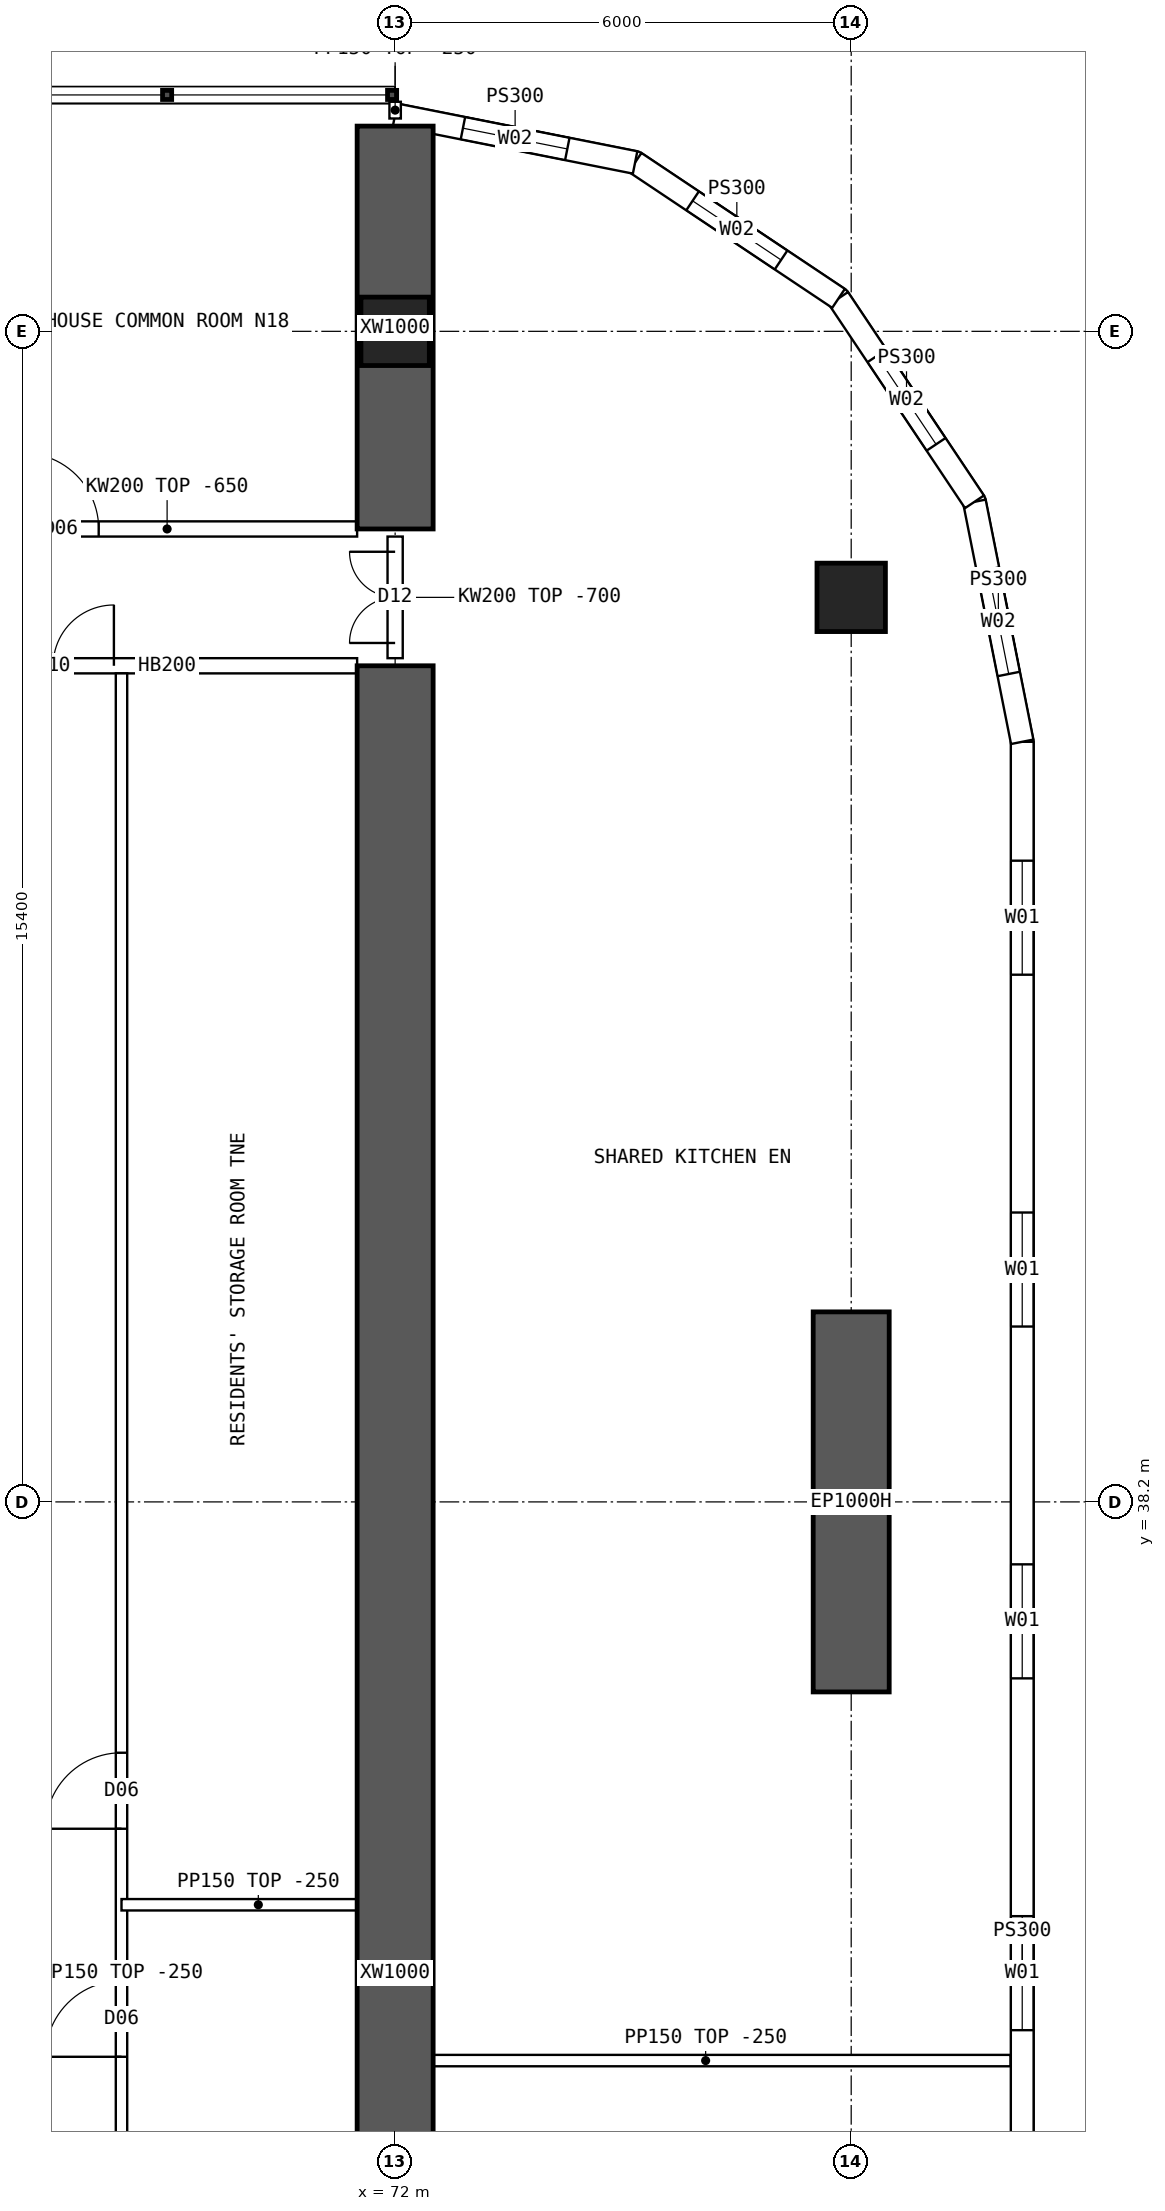
"""IFC4 building model, lengths in metres.
Left out: names, types, materials, properties, quantities, classifications, styles, units other than length and angle.
Written with IfcOpenShell. Run it as: python <this file> out.ifc"""

import sys

from ifc_helpers import new_model, si_unit, direction, frame, frame_2d, origin, origin_2d, place, context, subcontext, project, spatial, polyline, rectangle, hollow_rectangle, outline, extrude, element, fill, save


model = new_model("IFC4")
c1 = context("Model", 3, precision=1e-05, world=origin(), true_north=direction((0.0, 1.0)))
c2 = subcontext(c1, "Body", "Model", "MODEL_VIEW")
j1 = project(units=[si_unit("LENGTHUNIT", "METRE"), si_unit("PLANEANGLEUNIT", "RADIAN")], contexts=[c1])
p1 = place(None, origin())
s1 = spatial("IfcSite", under=j1, at=p1, CompositionType="ELEMENT")
p2 = place(p1, origin())
s2 = spatial("IfcBuilding", under=s1, at=p2, CompositionType="ELEMENT")
p3 = place(p2, frame((0.0, 0.0, 53.95)))
s3 = spatial("IfcBuildingStorey", under=s2, at=p3, CompositionType="ELEMENT", Elevation=53.95)
for number, where, z_axis, x_axis in (
    (1, (72.0, 53.6, 0.0), (0.0, 0.0, 1.0), (1.0, 0.0, 0.0)),
    (2, (78.0, 50.1, 0.0), (0.0, 0.0, 1.0), (1.0, 0.0, 0.0)),
):
    element("IfcColumn", number, at=place(p3, frame(where, z_axis=z_axis, x_axis=x_axis)), inside=s3, PredefinedType="COLUMN", context=c2, shape_type="SweptSolid", body=[
        extrude(hollow_rectangle(XDim=0.9, YDim=0.9, WallThickness=0.09, at=origin_2d()), origin(), (0.0, 0.0, 1.0), 3.75),
    ])
p4 = place(p3, frame((78.0, 35.7, 0.0), z_axis=(0.0, 0.0, 1.0), x_axis=(0.0, 1.0, 0.0)))
e3 = element("IfcWall", 3, at=p4, inside=s3, PredefinedType="SHEAR", context=c2, shape_type="SweptSolid", body=[
    extrude(rectangle(XDim=5.0, YDim=1.0, at=frame_2d((2.5, 0.0))), origin(), (0.0, 0.0, 1.0), 3.75),
])
p5 = place(p3, frame((72.0, 51.0, 0.0), z_axis=(0.0, 0.0, 1.0), x_axis=(0.0, 1.0, 0.0)))
e4 = element("IfcWall", 4, at=p5, inside=s3, PredefinedType="SHEAR", context=c2, shape_type="SweptSolid", body=[
    extrude(rectangle(XDim=5.3, YDim=1.0, at=frame_2d((2.65, 0.0))), origin(), (0.0, 0.0, 1.0), 3.75),
])
p6 = place(p3, frame((72.0, 14.8, 0.0), z_axis=(0.0, 0.0, 1.0), x_axis=(0.0, 1.0, 0.0)))
e5 = element("IfcWall", 5, at=p6, inside=s3, PredefinedType="SHEAR", context=c2, shape_type="SweptSolid", body=[
    extrude(rectangle(XDim=34.4, YDim=1.0, at=frame_2d((17.2, 0.0))), origin(), (0.0, 0.0, 1.0), 3.75),
])
p7 = place(p3, frame((80.25, 15.8, 0.0), z_axis=(0.0, 0.0, 1.0), x_axis=(0.0, 1.0, 0.0)))
e6 = element("IfcWall", 6, at=p7, inside=s3, PredefinedType="SOLIDWALL", context=c2, shape_type="SweptSolid", body=[
    extrude(outline(polyline([(-0.015, -0.15), (32.415, -0.15), (32.385, 0.15), (0.015, 0.15), (-0.015, -0.15)])), origin(), (0.0, 0.0, 1.0), 3.5),
])
p8 = place(p7, frame((1.564, 0.0, 0.9)))
e7 = element("IfcOpeningElement", 7, at=p8, cuts=e6, PredefinedType="OPENING", context=c2, shape_type="SweptSolid", body=[
    extrude(rectangle(XDim=1.5, YDim=2.0, at=frame_2d((0.75, 1.0))), frame((0.0, 0.16, 0.0), z_axis=(0.0, -1.0, 0.0), x_axis=(1.0, 0.0, 0.0)), (0.0, 0.0, 1.0), 0.32),
])
p9 = place(p7, frame((6.193, 0.0, 0.9)))
e8 = element("IfcOpeningElement", 8, at=p9, cuts=e6, PredefinedType="OPENING", context=c2, shape_type="SweptSolid", body=[
    extrude(rectangle(XDim=1.5, YDim=2.0, at=frame_2d((0.75, 1.0))), frame((0.0, 0.16, 0.0), z_axis=(0.0, -1.0, 0.0), x_axis=(1.0, 0.0, 0.0)), (0.0, 0.0, 1.0), 0.32),
])
p10 = place(p7, frame((10.822, 0.0, 0.9)))
e9 = element("IfcOpeningElement", 9, at=p10, cuts=e6, PredefinedType="OPENING", context=c2, shape_type="SweptSolid", body=[
    extrude(rectangle(XDim=1.5, YDim=2.0, at=frame_2d((0.75, 1.0))), frame((0.0, 0.16, 0.0), z_axis=(0.0, -1.0, 0.0), x_axis=(1.0, 0.0, 0.0)), (0.0, 0.0, 1.0), 0.32),
])
p11 = place(p7, frame((15.45, 0.0, 0.9)))
e10 = element("IfcOpeningElement", 10, at=p11, cuts=e6, PredefinedType="OPENING", context=c2, shape_type="SweptSolid", body=[
    extrude(rectangle(XDim=1.5, YDim=2.0, at=frame_2d((0.75, 1.0))), frame((0.0, 0.16, 0.0), z_axis=(0.0, -1.0, 0.0), x_axis=(1.0, 0.0, 0.0)), (0.0, 0.0, 1.0), 0.32),
])
p12 = place(p7, frame((20.079, 0.0, 0.9)))
e11 = element("IfcOpeningElement", 11, at=p12, cuts=e6, PredefinedType="OPENING", context=c2, shape_type="SweptSolid", body=[
    extrude(rectangle(XDim=1.5, YDim=2.0, at=frame_2d((0.75, 1.0))), frame((0.0, 0.16, 0.0), z_axis=(0.0, -1.0, 0.0), x_axis=(1.0, 0.0, 0.0)), (0.0, 0.0, 1.0), 0.32),
])
p13 = place(p7, frame((24.707, 0.0, 0.9)))
e12 = element("IfcOpeningElement", 12, at=p13, cuts=e6, PredefinedType="OPENING", context=c2, shape_type="SweptSolid", body=[
    extrude(rectangle(XDim=1.5, YDim=2.0, at=frame_2d((0.75, 1.0))), frame((0.0, 0.16, 0.0), z_axis=(0.0, -1.0, 0.0), x_axis=(1.0, 0.0, 0.0)), (0.0, 0.0, 1.0), 0.32),
])
p14 = place(p7, frame((29.336, 0.0, 0.9)))
e13 = element("IfcOpeningElement", 13, at=p14, cuts=e6, PredefinedType="OPENING", context=c2, shape_type="SweptSolid", body=[
    extrude(rectangle(XDim=1.5, YDim=2.0, at=frame_2d((0.75, 1.0))), frame((0.0, 0.16, 0.0), z_axis=(0.0, -1.0, 0.0), x_axis=(1.0, 0.0, 0.0)), (0.0, 0.0, 1.0), 0.32),
])
p15 = place(p3, frame((80.25, 48.2, 0.0), z_axis=(0.0, 0.0, 1.0), x_axis=(-0.195065901187, 0.980790137692, 0.0)))
e14 = element("IfcWall", 14, at=p15, inside=s3, PredefinedType="SOLIDWALL", context=c2, shape_type="SweptSolid", body=[
    extrude(outline(polyline([(-0.015, -0.15), (3.249, -0.15), (3.189, 0.15), (0.015, 0.15), (-0.015, -0.15)])), origin(), (0.0, 0.0, 1.0), 3.5),
])
p16 = place(p15, frame((0.909, 0.0, 0.9)))
e15 = element("IfcOpeningElement", 15, at=p16, cuts=e14, PredefinedType="OPENING", context=c2, shape_type="SweptSolid", body=[
    extrude(rectangle(XDim=1.4, YDim=1.8, at=frame_2d((0.7, 0.9))), frame((0.0, 0.16, 0.0), z_axis=(0.0, -1.0, 0.0), x_axis=(1.0, 0.0, 0.0)), (0.0, 0.0, 1.0), 0.32),
])
p17 = place(p3, frame((79.622, 51.357, 0.0), z_axis=(0.0, 0.0, 1.0), x_axis=(-0.555609954424, 0.831443069936, 0.0)))
e16 = element("IfcWall", 16, at=p17, inside=s3, PredefinedType="SOLIDWALL", context=c2, shape_type="SweptSolid", body=[
    extrude(outline(polyline([(-0.03, -0.15), (3.249, -0.15), (3.189, 0.15), (0.03, 0.15), (-0.03, -0.15)])), origin(), (0.0, 0.0, 1.0), 3.5),
])
p18 = place(p17, frame((0.909, 0.0, 0.9)))
e17 = element("IfcOpeningElement", 17, at=p18, cuts=e16, PredefinedType="OPENING", context=c2, shape_type="SweptSolid", body=[
    extrude(rectangle(XDim=1.4, YDim=1.8, at=frame_2d((0.7, 0.9))), frame((0.0, 0.16, 0.0), z_axis=(0.0, -1.0, 0.0), x_axis=(1.0, 0.0, 0.0)), (0.0, 0.0, 1.0), 0.32),
])
p19 = place(p3, frame((77.833, 54.034, 0.0), z_axis=(0.0, 0.0, 1.0), x_axis=(-0.831478105043, 0.555557522525, 0.0)))
e18 = element("IfcWall", 18, at=p19, inside=s3, PredefinedType="SOLIDWALL", context=c2, shape_type="SweptSolid", body=[
    extrude(outline(polyline([(-0.03, -0.15), (3.249, -0.15), (3.189, 0.15), (0.03, 0.15), (-0.03, -0.15)])), origin(), (0.0, 0.0, 1.0), 3.5),
])
p20 = place(p19, frame((0.909, 0.0, 0.9)))
e19 = element("IfcOpeningElement", 19, at=p20, cuts=e18, PredefinedType="OPENING", context=c2, shape_type="SweptSolid", body=[
    extrude(rectangle(XDim=1.4, YDim=1.8, at=frame_2d((0.7, 0.9))), frame((0.0, 0.16, 0.0), z_axis=(0.0, -1.0, 0.0), x_axis=(1.0, 0.0, 0.0)), (0.0, 0.0, 1.0), 0.32),
])
p21 = place(p3, frame((75.157, 55.822, 0.0), z_axis=(0.0, 0.0, 1.0), x_axis=(-0.980787251524, 0.195080412259, 0.0)))
e20 = element("IfcWall", 20, at=p21, inside=s3, PredefinedType="SOLIDWALL", context=c2, shape_type="SweptSolid", body=[
    extrude(outline(polyline([(-0.03, -0.15), (3.249, -0.15), (3.189, 0.15), (0.03, 0.15), (-0.03, -0.15)])), origin(), (0.0, 0.0, 1.0), 3.5),
])
p22 = place(p21, frame((0.909, 0.0, 0.9)))
e21 = element("IfcOpeningElement", 21, at=p22, cuts=e20, PredefinedType="OPENING", context=c2, shape_type="SweptSolid", body=[
    extrude(rectangle(XDim=1.4, YDim=1.8, at=frame_2d((0.7, 0.9))), frame((0.0, 0.16, 0.0), z_axis=(0.0, -1.0, 0.0), x_axis=(1.0, 0.0, 0.0)), (0.0, 0.0, 1.0), 0.32),
])
p23 = place(p3, frame((66.5, 51.0, 0.0), z_axis=(0.0, 0.0, 1.0), x_axis=(1.0, 0.0, 0.0)))
e22 = element("IfcWall", 22, at=p23, inside=s3, PredefinedType="SOLIDWALL", context=c2, shape_type="SweptSolid", body=[
    extrude(outline(polyline([(0.0, 0.0), (5.0, 0.0), (5.0, 3.1), (0.0, 3.1), (0.0, 0.0)])), frame((0.0, 0.1, 0.0), z_axis=(0.0, -1.0, 0.0), x_axis=(1.0, 0.0, 0.0)), (0.0, 0.0, 1.0), 0.2),
])
p24 = place(p23, frame((0.6, 0.0, 0.0)))
e23 = element("IfcOpeningElement", 23, at=p24, cuts=e22, PredefinedType="OPENING", context=c2, shape_type="SweptSolid", body=[
    extrude(rectangle(XDim=1.0, YDim=2.1, at=frame_2d((0.5, 1.05))), frame((0.0, 0.11, 0.0), z_axis=(0.0, -1.0, 0.0), x_axis=(1.0, 0.0, 0.0)), (0.0, 0.0, 1.0), 0.22),
])
p25 = place(p3, frame((66.5, 49.2, 0.0), z_axis=(0.0, 0.0, 1.0), x_axis=(1.0, 0.0, 0.0)))
e24 = element("IfcWall", 24, at=p25, inside=s3, PredefinedType="SOLIDWALL", context=c2, shape_type="SweptSolid", body=[
    extrude(rectangle(XDim=5.0, YDim=0.2, at=frame_2d((2.5, 0.0))), origin(), (0.0, 0.0, 1.0), 3.5),
])
p26 = place(p25, frame((0.2, 0.0, 0.0)))
e25 = element("IfcOpeningElement", 25, at=p26, cuts=e24, PredefinedType="OPENING", context=c2, shape_type="SweptSolid", body=[
    extrude(rectangle(XDim=1.6, YDim=2.1, at=frame_2d((0.8, 1.05))), frame((0.0, 0.11, 0.0), z_axis=(0.0, -1.0, 0.0), x_axis=(1.0, 0.0, 0.0)), (0.0, 0.0, 1.0), 0.22),
])
p27 = place(p3, frame((68.4, 14.9, 0.0), z_axis=(0.0, 0.0, 1.0), x_axis=(0.0, 1.0, 0.0)))
e26 = element("IfcWall", 26, at=p27, inside=s3, PredefinedType="PARTITIONING", context=c2, shape_type="SweptSolid", body=[
    extrude(rectangle(XDim=34.2, YDim=0.15, at=frame_2d((17.1, 0.0))), origin(), (0.0, 0.0, 1.0), 3.5),
])
p28 = place(p27, frame((16.0, 0.0, 0.0)))
e27 = element("IfcOpeningElement", 27, at=p28, cuts=e26, PredefinedType="OPENING", context=c2, shape_type="SweptSolid", body=[
    extrude(rectangle(XDim=1.0, YDim=2.1, at=frame_2d((0.5, 1.05))), frame((0.0, 0.085, 0.0), z_axis=(0.0, -1.0, 0.0), x_axis=(1.0, 0.0, 0.0)), (0.0, 0.0, 1.0), 0.17),
])
p29 = place(p27, frame((19.0, 0.0, 0.0)))
e28 = element("IfcOpeningElement", 28, at=p29, cuts=e26, PredefinedType="OPENING", context=c2, shape_type="SweptSolid", body=[
    extrude(rectangle(XDim=1.0, YDim=2.1, at=frame_2d((0.5, 1.05))), frame((0.0, 0.085, 0.0), z_axis=(0.0, -1.0, 0.0), x_axis=(1.0, 0.0, 0.0)), (0.0, 0.0, 1.0), 0.17),
])
p30 = place(p3, frame((68.4, 32.9, 0.0), z_axis=(0.0, 0.0, 1.0), x_axis=(1.0, 0.0, 0.0)))
e29 = element("IfcWall", 29, at=p30, inside=s3, PredefinedType="PARTITIONING", context=c2, shape_type="SweptSolid", body=[
    extrude(rectangle(XDim=3.6, YDim=0.15, at=frame_2d((1.8, 0.0))), origin(), (0.0, 0.0, 1.0), 3.5),
])
p31 = place(p3, frame((72.075, 30.85, 0.0), z_axis=(0.0, 0.0, 1.0), x_axis=(1.0, 0.0, 0.0)))
e30 = element("IfcWall", 30, at=p31, inside=s3, PredefinedType="PARTITIONING", context=c2, shape_type="SweptSolid", body=[
    extrude(outline(polyline([(0.0, 0.0), (8.02, 0.0), (8.02, 3.5), (6.227, 3.5), (6.225, 3.05), (5.627, 3.05), (5.625, 3.5), (0.0, 3.5), (0.0, 0.0)])), frame((0.0, 0.075, 0.0), z_axis=(0.0, -1.0, 0.0), x_axis=(1.0, 0.0, 0.0)), (0.0, 0.0, 1.0), 0.15),
])
p32 = place(p3, frame((72.0, 49.3, 0.0), z_axis=(0.0, 0.0, 1.0), x_axis=(0.0, 1.0, 0.0)))
e31 = element("IfcWall", 31, at=p32, inside=s3, PredefinedType="SOLIDWALL", context=c2, shape_type="SweptSolid", body=[
    extrude(outline(polyline([(0.0, 0.0), (1.6, 0.0), (1.6, 3.05), (0.0, 3.05), (0.0, 0.0)])), frame((0.0, 0.1, 0.0), z_axis=(0.0, -1.0, 0.0), x_axis=(1.0, 0.0, 0.0)), (0.0, 0.0, 1.0), 0.2),
])
p33 = place(p32, frame((0.2, 0.0, 0.0)))
e32 = element("IfcOpeningElement", 32, at=p33, cuts=e31, PredefinedType="OPENING", context=c2, shape_type="SweptSolid", body=[
    extrude(rectangle(XDim=1.2, YDim=2.1, at=frame_2d((0.6, 1.05))), frame((0.0, 0.11, 0.0), z_axis=(0.0, -1.0, 0.0), x_axis=(1.0, 0.0, 0.0)), (0.0, 0.0, 1.0), 0.22),
])
p34 = place(p3, frame((72.0, 56.4, 0.0), z_axis=(0.0, 0.0, 1.0), x_axis=(0.0, 1.0, 0.0)))
e33 = element("IfcWall", 33, at=p34, inside=s3, PredefinedType="PARTITIONING", context=c2, shape_type="SweptSolid", body=[
    extrude(rectangle(XDim=0.22, YDim=0.15, at=frame_2d((0.11, 0.0))), origin(), (0.0, 0.0, 1.0), 3.5),
])
p35 = place(p11, origin())
e34 = element("IfcWindow", 34, at=p35, inside=s3, PartitioningType="SINGLE_PANEL", PredefinedType="WINDOW", context=c2, shape_type="SweptSolid", body=[
    extrude(rectangle(XDim=1.5, YDim=2.0, at=frame_2d((0.75, 1.0))), frame((0.0, 0.03, 0.0), z_axis=(0.0, -1.0, 0.0), x_axis=(1.0, 0.0, 0.0)), (0.0, 0.0, 1.0), 0.06),
])
fill(e10, e34)
p36 = place(p12, origin())
e35 = element("IfcWindow", 35, at=p36, inside=s3, PartitioningType="SINGLE_PANEL", PredefinedType="WINDOW", context=c2, shape_type="SweptSolid", body=[
    extrude(rectangle(XDim=1.5, YDim=2.0, at=frame_2d((0.75, 1.0))), frame((0.0, 0.03, 0.0), z_axis=(0.0, -1.0, 0.0), x_axis=(1.0, 0.0, 0.0)), (0.0, 0.0, 1.0), 0.06),
])
fill(e11, e35)
p37 = place(p13, origin())
e36 = element("IfcWindow", 36, at=p37, inside=s3, PartitioningType="SINGLE_PANEL", PredefinedType="WINDOW", context=c2, shape_type="SweptSolid", body=[
    extrude(rectangle(XDim=1.5, YDim=2.0, at=frame_2d((0.75, 1.0))), frame((0.0, 0.03, 0.0), z_axis=(0.0, -1.0, 0.0), x_axis=(1.0, 0.0, 0.0)), (0.0, 0.0, 1.0), 0.06),
])
fill(e12, e36)
p38 = place(p14, origin())
e37 = element("IfcWindow", 37, at=p38, inside=s3, PartitioningType="SINGLE_PANEL", PredefinedType="WINDOW", context=c2, shape_type="SweptSolid", body=[
    extrude(rectangle(XDim=1.5, YDim=2.0, at=frame_2d((0.75, 1.0))), frame((0.0, 0.03, 0.0), z_axis=(0.0, -1.0, 0.0), x_axis=(1.0, 0.0, 0.0)), (0.0, 0.0, 1.0), 0.06),
])
fill(e13, e37)
p39 = place(p16, origin())
e38 = element("IfcWindow", 38, at=p39, inside=s3, PartitioningType="SINGLE_PANEL", PredefinedType="WINDOW", context=c2, shape_type="SweptSolid", body=[
    extrude(rectangle(XDim=1.4, YDim=1.8, at=frame_2d((0.7, 0.9))), frame((0.0, 0.03, 0.0), z_axis=(0.0, -1.0, 0.0), x_axis=(1.0, 0.0, 0.0)), (0.0, 0.0, 1.0), 0.06),
])
fill(e15, e38)
p40 = place(p18, origin())
e39 = element("IfcWindow", 39, at=p40, inside=s3, PartitioningType="SINGLE_PANEL", PredefinedType="WINDOW", context=c2, shape_type="SweptSolid", body=[
    extrude(rectangle(XDim=1.4, YDim=1.8, at=frame_2d((0.7, 0.9))), frame((0.0, 0.03, 0.0), z_axis=(0.0, -1.0, 0.0), x_axis=(1.0, 0.0, 0.0)), (0.0, 0.0, 1.0), 0.06),
])
fill(e17, e39)
p41 = place(p20, origin())
e40 = element("IfcWindow", 40, at=p41, inside=s3, PartitioningType="SINGLE_PANEL", PredefinedType="WINDOW", context=c2, shape_type="SweptSolid", body=[
    extrude(rectangle(XDim=1.4, YDim=1.8, at=frame_2d((0.7, 0.9))), frame((0.0, 0.03, 0.0), z_axis=(0.0, -1.0, 0.0), x_axis=(1.0, 0.0, 0.0)), (0.0, 0.0, 1.0), 0.06),
])
fill(e19, e40)
p42 = place(p22, origin())
e41 = element("IfcWindow", 41, at=p42, inside=s3, PartitioningType="SINGLE_PANEL", PredefinedType="WINDOW", context=c2, shape_type="SweptSolid", body=[
    extrude(rectangle(XDim=1.4, YDim=1.8, at=frame_2d((0.7, 0.9))), frame((0.0, 0.03, 0.0), z_axis=(0.0, -1.0, 0.0), x_axis=(1.0, 0.0, 0.0)), (0.0, 0.0, 1.0), 0.06),
])
fill(e21, e41)
p43 = place(p26, origin())
e42 = element("IfcDoor", 42, at=p43, inside=s3, OperationType="DOUBLE_DOOR_SINGLE_SWING", PredefinedType="DOOR", context=c2, shape_type="SweptSolid", body=[
    extrude(rectangle(XDim=1.6, YDim=2.1, at=frame_2d((0.8, 1.05))), frame((0.0, 0.025, 0.0), z_axis=(0.0, -1.0, 0.0), x_axis=(1.0, 0.0, 0.0)), (0.0, 0.0, 1.0), 0.05),
])
fill(e25, e42)
p44 = place(p24, origin())
e43 = element("IfcDoor", 43, at=p44, inside=s3, OperationType="SINGLE_SWING_LEFT", PredefinedType="DOOR", context=c2, shape_type="SweptSolid", body=[
    extrude(rectangle(XDim=1.0, YDim=2.1, at=frame_2d((0.5, 1.05))), frame((0.0, 0.025, 0.0), z_axis=(0.0, -1.0, 0.0), x_axis=(1.0, 0.0, 0.0)), (0.0, 0.0, 1.0), 0.05),
])
fill(e23, e43)
p45 = place(p28, origin())
e44 = element("IfcDoor", 44, at=p45, inside=s3, OperationType="SINGLE_SWING_LEFT", PredefinedType="DOOR", context=c2, shape_type="SweptSolid", body=[
    extrude(rectangle(XDim=1.0, YDim=2.1, at=frame_2d((0.5, 1.05))), frame((0.0, 0.025, 0.0), z_axis=(0.0, -1.0, 0.0), x_axis=(1.0, 0.0, 0.0)), (0.0, 0.0, 1.0), 0.05),
])
fill(e27, e44)
p46 = place(p29, origin())
e45 = element("IfcDoor", 45, at=p46, inside=s3, OperationType="SINGLE_SWING_LEFT", PredefinedType="DOOR", context=c2, shape_type="SweptSolid", body=[
    extrude(rectangle(XDim=1.0, YDim=2.1, at=frame_2d((0.5, 1.05))), frame((0.0, 0.025, 0.0), z_axis=(0.0, -1.0, 0.0), x_axis=(1.0, 0.0, 0.0)), (0.0, 0.0, 1.0), 0.05),
])
fill(e28, e45)
p47 = place(p33, origin())
e46 = element("IfcDoor", 46, at=p47, inside=s3, OperationType="DOUBLE_DOOR_SINGLE_SWING", PredefinedType="DOOR", context=c2, shape_type="SweptSolid", body=[
    extrude(rectangle(XDim=1.2, YDim=2.1, at=frame_2d((0.6, 1.05))), frame((0.0, 0.025, 0.0), z_axis=(0.0, -1.0, 0.0), x_axis=(1.0, 0.0, 0.0)), (0.0, 0.0, 1.0), 0.05),
])
fill(e32, e46)
save(model, sys.argv[1])
